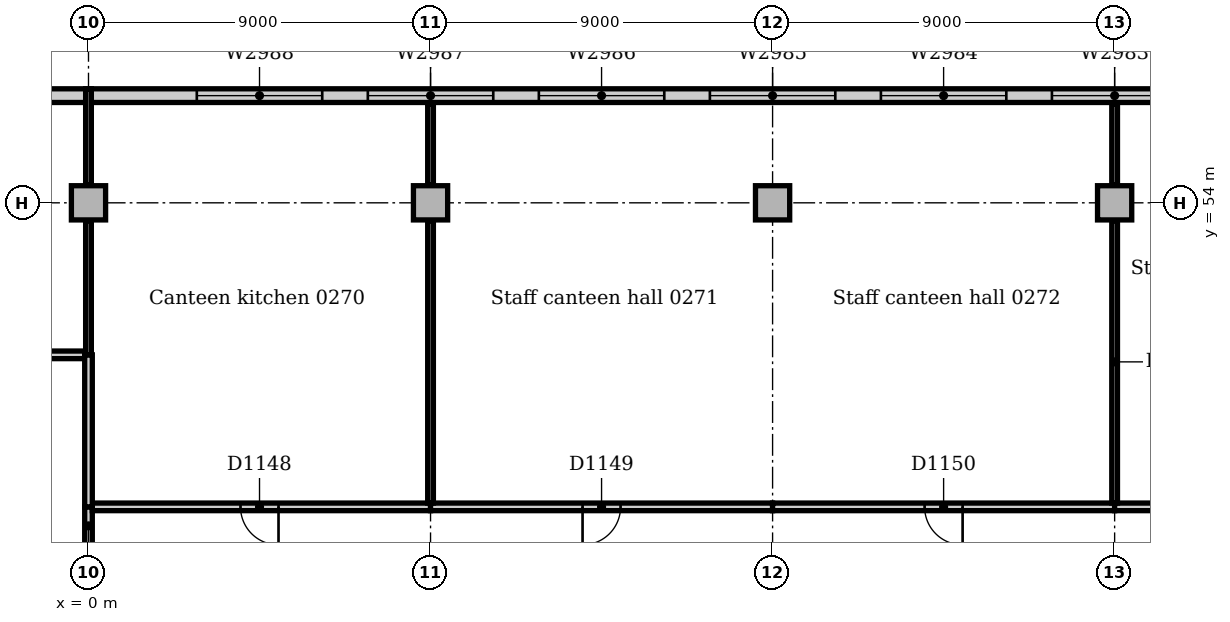
"""IFC4 building model, lengths in metres.
Left out: names, types, materials, properties, quantities, classifications, styles, units other than length and angle.
Written with IfcOpenShell. Run it as: python <this file> out.ifc"""

import sys

from ifc_helpers import new_model, si_unit, direction, frame, frame_2d, origin, origin_2d, place, context, subcontext, project, spatial, rectangle, extrude, element, fill, save


model = new_model("IFC4")
c1 = context("Model", 3, precision=1e-05, world=origin(), true_north=direction((0.0, 1.0)))
c2 = subcontext(c1, "Body", "Model", "MODEL_VIEW")
j1 = project(units=[si_unit("LENGTHUNIT", "METRE"), si_unit("PLANEANGLEUNIT", "RADIAN")], contexts=[c1])
p1 = place(None, origin())
s1 = spatial("IfcSite", under=j1, at=p1, CompositionType="ELEMENT")
p2 = place(p1, origin())
s2 = spatial("IfcBuilding", under=s1, at=p2, CompositionType="ELEMENT")
p3 = place(p2, frame((0.0, 0.0, 11.0)))
s3 = spatial("IfcBuildingStorey", under=s2, at=p3, CompositionType="ELEMENT", Elevation=11.0)
for number, where, z_axis, x_axis in (
    (1, (0.0, 54.0, 0.0), (0.0, 0.0, 1.0), (1.0, 0.0, 0.0)),
    (2, (9.0, 54.0, 0.0), (0.0, 0.0, 1.0), (1.0, 0.0, 0.0)),
    (3, (18.0, 54.0, 0.0), (0.0, 0.0, 1.0), (1.0, 0.0, 0.0)),
    (4, (27.0, 54.0, 0.0), (0.0, 0.0, 1.0), (1.0, 0.0, 0.0)),
):
    element("IfcColumn", number, at=place(p3, frame(where, z_axis=z_axis, x_axis=x_axis)), inside=s3, PredefinedType="COLUMN", context=c2, shape_type="SweptSolid", body=[
        extrude(rectangle(XDim=0.9, YDim=0.9, at=origin_2d()), origin(), (0.0, 0.0, 1.0), 4.7),
    ])
p4 = place(p3, frame((63.0, 56.82, 0.0), z_axis=(0.0, 0.0, 1.0), x_axis=(-1.0, 0.0, 0.0)))
e5 = element("IfcWall", 5, at=p4, inside=s3, PredefinedType="STANDARD", context=c2, shape_type="SweptSolid", body=[
    extrude(rectangle(XDim=144.0, YDim=0.36, at=frame_2d((72.0, 0.0))), origin(), (0.0, 0.0, 1.0), 4.7),
])
p5 = place(p4, frame((2.85, 0.0, 0.9)))
e6 = element("IfcOpeningElement", 6, at=p5, cuts=e5, PredefinedType="OPENING", context=c2, shape_type="SweptSolid", body=[
    extrude(rectangle(XDim=3.3, YDim=2.4, at=frame_2d((1.65, 1.2))), frame((0.0, 0.19, 0.0), z_axis=(0.0, -1.0, 0.0), x_axis=(1.0, 0.0, 0.0)), (0.0, 0.0, 1.0), 0.38),
])
p6 = place(p4, frame((7.35, 0.0, 0.9)))
e7 = element("IfcOpeningElement", 7, at=p6, cuts=e5, PredefinedType="OPENING", context=c2, shape_type="SweptSolid", body=[
    extrude(rectangle(XDim=3.3, YDim=2.4, at=frame_2d((1.65, 1.2))), frame((0.0, 0.19, 0.0), z_axis=(0.0, -1.0, 0.0), x_axis=(1.0, 0.0, 0.0)), (0.0, 0.0, 1.0), 0.38),
])
p7 = place(p4, frame((11.85, 0.0, 0.9)))
e8 = element("IfcOpeningElement", 8, at=p7, cuts=e5, PredefinedType="OPENING", context=c2, shape_type="SweptSolid", body=[
    extrude(rectangle(XDim=3.3, YDim=2.4, at=frame_2d((1.65, 1.2))), frame((0.0, 0.19, 0.0), z_axis=(0.0, -1.0, 0.0), x_axis=(1.0, 0.0, 0.0)), (0.0, 0.0, 1.0), 0.38),
])
p8 = place(p4, frame((16.35, 0.0, 0.9)))
e9 = element("IfcOpeningElement", 9, at=p8, cuts=e5, PredefinedType="OPENING", context=c2, shape_type="SweptSolid", body=[
    extrude(rectangle(XDim=3.3, YDim=2.4, at=frame_2d((1.65, 1.2))), frame((0.0, 0.19, 0.0), z_axis=(0.0, -1.0, 0.0), x_axis=(1.0, 0.0, 0.0)), (0.0, 0.0, 1.0), 0.38),
])
p9 = place(p4, frame((20.85, 0.0, 0.9)))
e10 = element("IfcOpeningElement", 10, at=p9, cuts=e5, PredefinedType="OPENING", context=c2, shape_type="SweptSolid", body=[
    extrude(rectangle(XDim=3.3, YDim=2.4, at=frame_2d((1.65, 1.2))), frame((0.0, 0.19, 0.0), z_axis=(0.0, -1.0, 0.0), x_axis=(1.0, 0.0, 0.0)), (0.0, 0.0, 1.0), 0.38),
])
p10 = place(p4, frame((25.35, 0.0, 0.9)))
e11 = element("IfcOpeningElement", 11, at=p10, cuts=e5, PredefinedType="OPENING", context=c2, shape_type="SweptSolid", body=[
    extrude(rectangle(XDim=3.3, YDim=2.4, at=frame_2d((1.65, 1.2))), frame((0.0, 0.19, 0.0), z_axis=(0.0, -1.0, 0.0), x_axis=(1.0, 0.0, 0.0)), (0.0, 0.0, 1.0), 0.38),
])
p11 = place(p4, frame((29.85, 0.0, 0.9)))
e12 = element("IfcOpeningElement", 12, at=p11, cuts=e5, PredefinedType="OPENING", context=c2, shape_type="SweptSolid", body=[
    extrude(rectangle(XDim=3.3, YDim=2.4, at=frame_2d((1.65, 1.2))), frame((0.0, 0.19, 0.0), z_axis=(0.0, -1.0, 0.0), x_axis=(1.0, 0.0, 0.0)), (0.0, 0.0, 1.0), 0.38),
])
p12 = place(p4, frame((34.35, 0.0, 0.9)))
e13 = element("IfcOpeningElement", 13, at=p12, cuts=e5, PredefinedType="OPENING", context=c2, shape_type="SweptSolid", body=[
    extrude(rectangle(XDim=3.3, YDim=2.4, at=frame_2d((1.65, 1.2))), frame((0.0, 0.19, 0.0), z_axis=(0.0, -1.0, 0.0), x_axis=(1.0, 0.0, 0.0)), (0.0, 0.0, 1.0), 0.38),
])
p13 = place(p4, frame((38.85, 0.0, 0.9)))
e14 = element("IfcOpeningElement", 14, at=p13, cuts=e5, PredefinedType="OPENING", context=c2, shape_type="SweptSolid", body=[
    extrude(rectangle(XDim=3.3, YDim=2.4, at=frame_2d((1.65, 1.2))), frame((0.0, 0.19, 0.0), z_axis=(0.0, -1.0, 0.0), x_axis=(1.0, 0.0, 0.0)), (0.0, 0.0, 1.0), 0.38),
])
p14 = place(p4, frame((43.35, 0.0, 0.9)))
e15 = element("IfcOpeningElement", 15, at=p14, cuts=e5, PredefinedType="OPENING", context=c2, shape_type="SweptSolid", body=[
    extrude(rectangle(XDim=3.3, YDim=2.4, at=frame_2d((1.65, 1.2))), frame((0.0, 0.19, 0.0), z_axis=(0.0, -1.0, 0.0), x_axis=(1.0, 0.0, 0.0)), (0.0, 0.0, 1.0), 0.38),
])
p15 = place(p4, frame((47.85, 0.0, 0.9)))
e16 = element("IfcOpeningElement", 16, at=p15, cuts=e5, PredefinedType="OPENING", context=c2, shape_type="SweptSolid", body=[
    extrude(rectangle(XDim=3.3, YDim=2.4, at=frame_2d((1.65, 1.2))), frame((0.0, 0.19, 0.0), z_axis=(0.0, -1.0, 0.0), x_axis=(1.0, 0.0, 0.0)), (0.0, 0.0, 1.0), 0.38),
])
p16 = place(p4, frame((52.35, 0.0, 0.9)))
e17 = element("IfcOpeningElement", 17, at=p16, cuts=e5, PredefinedType="OPENING", context=c2, shape_type="SweptSolid", body=[
    extrude(rectangle(XDim=3.3, YDim=2.4, at=frame_2d((1.65, 1.2))), frame((0.0, 0.19, 0.0), z_axis=(0.0, -1.0, 0.0), x_axis=(1.0, 0.0, 0.0)), (0.0, 0.0, 1.0), 0.38),
])
p17 = place(p4, frame((56.85, 0.0, 0.9)))
e18 = element("IfcOpeningElement", 18, at=p17, cuts=e5, PredefinedType="OPENING", context=c2, shape_type="SweptSolid", body=[
    extrude(rectangle(XDim=3.3, YDim=2.4, at=frame_2d((1.65, 1.2))), frame((0.0, 0.19, 0.0), z_axis=(0.0, -1.0, 0.0), x_axis=(1.0, 0.0, 0.0)), (0.0, 0.0, 1.0), 0.38),
])
p18 = place(p4, frame((92.85, 0.0, 0.9)))
e19 = element("IfcOpeningElement", 19, at=p18, cuts=e5, PredefinedType="OPENING", context=c2, shape_type="SweptSolid", body=[
    extrude(rectangle(XDim=3.3, YDim=2.4, at=frame_2d((1.65, 1.2))), frame((0.0, 0.19, 0.0), z_axis=(0.0, -1.0, 0.0), x_axis=(1.0, 0.0, 0.0)), (0.0, 0.0, 1.0), 0.38),
])
p19 = place(p4, frame((97.35, 0.0, 0.9)))
e20 = element("IfcOpeningElement", 20, at=p19, cuts=e5, PredefinedType="OPENING", context=c2, shape_type="SweptSolid", body=[
    extrude(rectangle(XDim=3.3, YDim=2.4, at=frame_2d((1.65, 1.2))), frame((0.0, 0.19, 0.0), z_axis=(0.0, -1.0, 0.0), x_axis=(1.0, 0.0, 0.0)), (0.0, 0.0, 1.0), 0.38),
])
p20 = place(p4, frame((101.85, 0.0, 0.9)))
e21 = element("IfcOpeningElement", 21, at=p20, cuts=e5, PredefinedType="OPENING", context=c2, shape_type="SweptSolid", body=[
    extrude(rectangle(XDim=3.3, YDim=2.4, at=frame_2d((1.65, 1.2))), frame((0.0, 0.19, 0.0), z_axis=(0.0, -1.0, 0.0), x_axis=(1.0, 0.0, 0.0)), (0.0, 0.0, 1.0), 0.38),
])
p21 = place(p4, frame((106.35, 0.0, 0.9)))
e22 = element("IfcOpeningElement", 22, at=p21, cuts=e5, PredefinedType="OPENING", context=c2, shape_type="SweptSolid", body=[
    extrude(rectangle(XDim=3.3, YDim=2.4, at=frame_2d((1.65, 1.2))), frame((0.0, 0.19, 0.0), z_axis=(0.0, -1.0, 0.0), x_axis=(1.0, 0.0, 0.0)), (0.0, 0.0, 1.0), 0.38),
])
p22 = place(p4, frame((110.85, 0.0, 0.9)))
e23 = element("IfcOpeningElement", 23, at=p22, cuts=e5, PredefinedType="OPENING", context=c2, shape_type="SweptSolid", body=[
    extrude(rectangle(XDim=3.3, YDim=2.4, at=frame_2d((1.65, 1.2))), frame((0.0, 0.19, 0.0), z_axis=(0.0, -1.0, 0.0), x_axis=(1.0, 0.0, 0.0)), (0.0, 0.0, 1.0), 0.38),
])
p23 = place(p4, frame((115.35, 0.0, 0.9)))
e24 = element("IfcOpeningElement", 24, at=p23, cuts=e5, PredefinedType="OPENING", context=c2, shape_type="SweptSolid", body=[
    extrude(rectangle(XDim=3.3, YDim=2.4, at=frame_2d((1.65, 1.2))), frame((0.0, 0.19, 0.0), z_axis=(0.0, -1.0, 0.0), x_axis=(1.0, 0.0, 0.0)), (0.0, 0.0, 1.0), 0.38),
])
p24 = place(p4, frame((119.85, 0.0, 0.9)))
e25 = element("IfcOpeningElement", 25, at=p24, cuts=e5, PredefinedType="OPENING", context=c2, shape_type="SweptSolid", body=[
    extrude(rectangle(XDim=3.3, YDim=2.4, at=frame_2d((1.65, 1.2))), frame((0.0, 0.19, 0.0), z_axis=(0.0, -1.0, 0.0), x_axis=(1.0, 0.0, 0.0)), (0.0, 0.0, 1.0), 0.38),
])
p25 = place(p4, frame((124.35, 0.0, 0.9)))
e26 = element("IfcOpeningElement", 26, at=p25, cuts=e5, PredefinedType="OPENING", context=c2, shape_type="SweptSolid", body=[
    extrude(rectangle(XDim=3.3, YDim=2.4, at=frame_2d((1.65, 1.2))), frame((0.0, 0.19, 0.0), z_axis=(0.0, -1.0, 0.0), x_axis=(1.0, 0.0, 0.0)), (0.0, 0.0, 1.0), 0.38),
])
p26 = place(p4, frame((128.85, 0.0, 0.9)))
e27 = element("IfcOpeningElement", 27, at=p26, cuts=e5, PredefinedType="OPENING", context=c2, shape_type="SweptSolid", body=[
    extrude(rectangle(XDim=3.3, YDim=2.4, at=frame_2d((1.65, 1.2))), frame((0.0, 0.19, 0.0), z_axis=(0.0, -1.0, 0.0), x_axis=(1.0, 0.0, 0.0)), (0.0, 0.0, 1.0), 0.38),
])
p27 = place(p4, frame((133.35, 0.0, 0.9)))
e28 = element("IfcOpeningElement", 28, at=p27, cuts=e5, PredefinedType="OPENING", context=c2, shape_type="SweptSolid", body=[
    extrude(rectangle(XDim=3.3, YDim=2.4, at=frame_2d((1.65, 1.2))), frame((0.0, 0.19, 0.0), z_axis=(0.0, -1.0, 0.0), x_axis=(1.0, 0.0, 0.0)), (0.0, 0.0, 1.0), 0.38),
])
p28 = place(p4, frame((137.85, 0.0, 0.9)))
e29 = element("IfcOpeningElement", 29, at=p28, cuts=e5, PredefinedType="OPENING", context=c2, shape_type="SweptSolid", body=[
    extrude(rectangle(XDim=3.3, YDim=2.4, at=frame_2d((1.65, 1.2))), frame((0.0, 0.19, 0.0), z_axis=(0.0, -1.0, 0.0), x_axis=(1.0, 0.0, 0.0)), (0.0, 0.0, 1.0), 0.38),
])
p29 = place(p3, frame((0.0, 45.0, 0.0), z_axis=(0.0, 0.0, 1.0), x_axis=(0.0, 1.0, 0.0)))
e30 = element("IfcWall", 30, at=p29, inside=s3, PredefinedType="PARTITIONING", context=c2, shape_type="SweptSolid", body=[
    extrude(rectangle(XDim=1.0, YDim=0.2, at=frame_2d((0.5, 0.0))), origin(), (0.0, 0.0, 1.0), 4.7),
])
p30 = place(p3, frame((0.1, 46.0, 0.0), z_axis=(0.0, 0.0, 1.0), x_axis=(1.0, 0.0, 0.0)))
e31 = element("IfcWall", 31, at=p30, inside=s3, PredefinedType="PARTITIONING", context=c2, shape_type="SweptSolid", body=[
    extrude(rectangle(XDim=8.9, YDim=0.2, at=frame_2d((4.45, 0.0))), origin(), (0.0, 0.0, 1.0), 4.7),
])
p31 = place(p30, frame((3.9, 0.0, 0.0)))
e32 = element("IfcOpeningElement", 32, at=p31, cuts=e31, PredefinedType="OPENING", context=c2, shape_type="SweptSolid", body=[
    extrude(rectangle(XDim=1.0, YDim=2.1, at=frame_2d((0.5, 1.05))), frame((0.0, 0.11, 0.0), z_axis=(0.0, -1.0, 0.0), x_axis=(1.0, 0.0, 0.0)), (0.0, 0.0, 1.0), 0.22),
])
p32 = place(p3, frame((9.0, 46.0, 0.0), z_axis=(0.0, 0.0, 1.0), x_axis=(1.0, 0.0, 0.0)))
e33 = element("IfcWall", 33, at=p32, inside=s3, PredefinedType="PARTITIONING", context=c2, shape_type="SweptSolid", body=[
    extrude(rectangle(XDim=9.0, YDim=0.2, at=frame_2d((4.5, 0.0))), origin(), (0.0, 0.0, 1.0), 4.7),
])
p33 = place(p32, frame((4.0, 0.0, 0.0)))
e34 = element("IfcOpeningElement", 34, at=p33, cuts=e33, PredefinedType="OPENING", context=c2, shape_type="SweptSolid", body=[
    extrude(rectangle(XDim=1.0, YDim=2.1, at=frame_2d((0.5, 1.05))), frame((0.0, 0.11, 0.0), z_axis=(0.0, -1.0, 0.0), x_axis=(1.0, 0.0, 0.0)), (0.0, 0.0, 1.0), 0.22),
])
p34 = place(p3, frame((18.0, 46.0, 0.0), z_axis=(0.0, 0.0, 1.0), x_axis=(1.0, 0.0, 0.0)))
e35 = element("IfcWall", 35, at=p34, inside=s3, PredefinedType="PARTITIONING", context=c2, shape_type="SweptSolid", body=[
    extrude(rectangle(XDim=9.0, YDim=0.2, at=frame_2d((4.5, 0.0))), origin(), (0.0, 0.0, 1.0), 4.7),
])
p35 = place(p34, frame((4.0, 0.0, 0.0)))
e36 = element("IfcOpeningElement", 36, at=p35, cuts=e35, PredefinedType="OPENING", context=c2, shape_type="SweptSolid", body=[
    extrude(rectangle(XDim=1.0, YDim=2.1, at=frame_2d((0.5, 1.05))), frame((0.0, 0.11, 0.0), z_axis=(0.0, -1.0, 0.0), x_axis=(1.0, 0.0, 0.0)), (0.0, 0.0, 1.0), 0.22),
])
p36 = place(p3, frame((27.0, 46.0, 0.0), z_axis=(0.0, 0.0, 1.0), x_axis=(1.0, 0.0, 0.0)))
e37 = element("IfcWall", 37, at=p36, inside=s3, PredefinedType="PARTITIONING", context=c2, shape_type="SweptSolid", body=[
    extrude(rectangle(XDim=8.9, YDim=0.2, at=frame_2d((4.45, 0.0))), origin(), (0.0, 0.0, 1.0), 4.7),
])
p37 = place(p36, frame((4.0, 0.0, 0.0)))
e38 = element("IfcOpeningElement", 38, at=p37, cuts=e37, PredefinedType="OPENING", context=c2, shape_type="SweptSolid", body=[
    extrude(rectangle(XDim=1.0, YDim=2.1, at=frame_2d((0.5, 1.05))), frame((0.0, 0.11, 0.0), z_axis=(0.0, -1.0, 0.0), x_axis=(1.0, 0.0, 0.0)), (0.0, 0.0, 1.0), 0.22),
])
p38 = place(p3, frame((-9.0, 50.0, 0.0), z_axis=(0.0, 0.0, 1.0), x_axis=(1.0, 0.0, 0.0)))
e39 = element("IfcWall", 39, at=p38, inside=s3, PredefinedType="PARTITIONING", context=c2, shape_type="SweptSolid", body=[
    extrude(rectangle(XDim=8.9, YDim=0.2, at=frame_2d((4.45, 0.0))), origin(), (0.0, 0.0, 1.0), 4.7),
])
p39 = place(p38, frame((4.0, 0.0, 0.0)))
e40 = element("IfcOpeningElement", 40, at=p39, cuts=e39, PredefinedType="OPENING", context=c2, shape_type="SweptSolid", body=[
    extrude(rectangle(XDim=1.0, YDim=2.1, at=frame_2d((0.5, 1.05))), frame((0.0, 0.11, 0.0), z_axis=(0.0, -1.0, 0.0), x_axis=(1.0, 0.0, 0.0)), (0.0, 0.0, 1.0), 0.22),
])
p40 = place(p3, frame((0.0, 46.0, 0.0), z_axis=(0.0, 0.0, 1.0), x_axis=(0.0, 1.0, 0.0)))
e41 = element("IfcWall", 41, at=p40, inside=s3, PredefinedType="PARTITIONING", context=c2, shape_type="SweptSolid", body=[
    extrude(rectangle(XDim=4.0, YDim=0.2, at=frame_2d((2.0, 0.0))), origin(), (0.0, 0.0, 1.0), 4.7),
])
p41 = place(p3, frame((0.0, 50.0, 0.0), z_axis=(0.0, 0.0, 1.0), x_axis=(0.0, 1.0, 0.0)))
e42 = element("IfcWall", 42, at=p41, inside=s3, PredefinedType="PARTITIONING", context=c2, shape_type="SweptSolid", body=[
    extrude(rectangle(XDim=3.53, YDim=0.15, at=frame_2d((1.765, 0.0))), origin(), (0.0, 0.0, 1.0), 4.7),
])
p42 = place(p3, frame((0.0, 54.47, 0.0), z_axis=(0.0, 0.0, 1.0), x_axis=(0.0, 1.0, 0.0)))
e43 = element("IfcWall", 43, at=p42, inside=s3, PredefinedType="PARTITIONING", context=c2, shape_type="SweptSolid", body=[
    extrude(rectangle(XDim=2.53, YDim=0.15, at=frame_2d((1.265, 0.0))), origin(), (0.0, 0.0, 1.0), 4.7),
])
p43 = place(p3, frame((9.0, 46.1, 0.0), z_axis=(0.0, 0.0, 1.0), x_axis=(0.0, 1.0, 0.0)))
e44 = element("IfcWall", 44, at=p43, inside=s3, PredefinedType="PARTITIONING", context=c2, shape_type="SweptSolid", body=[
    extrude(rectangle(XDim=7.43, YDim=0.15, at=frame_2d((3.715, 0.0))), origin(), (0.0, 0.0, 1.0), 4.7),
])
p44 = place(p3, frame((9.0, 54.47, 0.0), z_axis=(0.0, 0.0, 1.0), x_axis=(0.0, 1.0, 0.0)))
e45 = element("IfcWall", 45, at=p44, inside=s3, PredefinedType="PARTITIONING", context=c2, shape_type="SweptSolid", body=[
    extrude(rectangle(XDim=2.13, YDim=0.15, at=frame_2d((1.065, 0.0))), origin(), (0.0, 0.0, 1.0), 4.7),
])
p45 = place(p3, frame((27.0, 46.1, 0.0), z_axis=(0.0, 0.0, 1.0), x_axis=(0.0, 1.0, 0.0)))
e46 = element("IfcWall", 46, at=p45, inside=s3, PredefinedType="PARTITIONING", context=c2, shape_type="SweptSolid", body=[
    extrude(rectangle(XDim=7.43, YDim=0.15, at=frame_2d((3.715, 0.0))), origin(), (0.0, 0.0, 1.0), 4.7),
])
p46 = place(p3, frame((27.0, 54.47, 0.0), z_axis=(0.0, 0.0, 1.0), x_axis=(0.0, 1.0, 0.0)))
e47 = element("IfcWall", 47, at=p46, inside=s3, PredefinedType="PARTITIONING", context=c2, shape_type="SweptSolid", body=[
    extrude(rectangle(XDim=2.13, YDim=0.15, at=frame_2d((1.065, 0.0))), origin(), (0.0, 0.0, 1.0), 4.7),
])
p47 = place(p12, origin())
e48 = element("IfcWindow", 48, at=p47, inside=s3, PartitioningType="SINGLE_PANEL", PredefinedType="WINDOW", context=c2, shape_type="SweptSolid", body=[
    extrude(rectangle(XDim=3.3, YDim=2.4, at=frame_2d((1.65, 1.2))), frame((0.0, 0.13, 0.0), z_axis=(0.0, -1.0, 0.0), x_axis=(1.0, 0.0, 0.0)), (0.0, 0.0, 1.0), 0.06),
])
fill(e13, e48)
p48 = place(p13, origin())
e49 = element("IfcWindow", 49, at=p48, inside=s3, PartitioningType="SINGLE_PANEL", PredefinedType="WINDOW", context=c2, shape_type="SweptSolid", body=[
    extrude(rectangle(XDim=3.3, YDim=2.4, at=frame_2d((1.65, 1.2))), frame((0.0, 0.13, 0.0), z_axis=(0.0, -1.0, 0.0), x_axis=(1.0, 0.0, 0.0)), (0.0, 0.0, 1.0), 0.06),
])
fill(e14, e49)
p49 = place(p14, origin())
e50 = element("IfcWindow", 50, at=p49, inside=s3, PartitioningType="SINGLE_PANEL", PredefinedType="WINDOW", context=c2, shape_type="SweptSolid", body=[
    extrude(rectangle(XDim=3.3, YDim=2.4, at=frame_2d((1.65, 1.2))), frame((0.0, 0.13, 0.0), z_axis=(0.0, -1.0, 0.0), x_axis=(1.0, 0.0, 0.0)), (0.0, 0.0, 1.0), 0.06),
])
fill(e15, e50)
p50 = place(p15, origin())
e51 = element("IfcWindow", 51, at=p50, inside=s3, PartitioningType="SINGLE_PANEL", PredefinedType="WINDOW", context=c2, shape_type="SweptSolid", body=[
    extrude(rectangle(XDim=3.3, YDim=2.4, at=frame_2d((1.65, 1.2))), frame((0.0, 0.13, 0.0), z_axis=(0.0, -1.0, 0.0), x_axis=(1.0, 0.0, 0.0)), (0.0, 0.0, 1.0), 0.06),
])
fill(e16, e51)
p51 = place(p16, origin())
e52 = element("IfcWindow", 52, at=p51, inside=s3, PartitioningType="SINGLE_PANEL", PredefinedType="WINDOW", context=c2, shape_type="SweptSolid", body=[
    extrude(rectangle(XDim=3.3, YDim=2.4, at=frame_2d((1.65, 1.2))), frame((0.0, 0.13, 0.0), z_axis=(0.0, -1.0, 0.0), x_axis=(1.0, 0.0, 0.0)), (0.0, 0.0, 1.0), 0.06),
])
fill(e17, e52)
p52 = place(p17, origin())
e53 = element("IfcWindow", 53, at=p52, inside=s3, PartitioningType="SINGLE_PANEL", PredefinedType="WINDOW", context=c2, shape_type="SweptSolid", body=[
    extrude(rectangle(XDim=3.3, YDim=2.4, at=frame_2d((1.65, 1.2))), frame((0.0, 0.13, 0.0), z_axis=(0.0, -1.0, 0.0), x_axis=(1.0, 0.0, 0.0)), (0.0, 0.0, 1.0), 0.06),
])
fill(e18, e53)
p53 = place(p31, frame((1.0, 0.0, 0.0), z_axis=(0.0, 0.0, 1.0), x_axis=(-1.0, 0.0, 0.0)))
e54 = element("IfcDoor", 54, at=p53, inside=s3, OperationType="SINGLE_SWING_LEFT", PredefinedType="DOOR", context=c2, shape_type="SweptSolid", body=[
    extrude(rectangle(XDim=1.0, YDim=2.1, at=frame_2d((0.5, 1.05))), frame((0.0, 0.025, 0.0), z_axis=(0.0, -1.0, 0.0), x_axis=(1.0, 0.0, 0.0)), (0.0, 0.0, 1.0), 0.05),
])
fill(e32, e54)
p54 = place(p33, frame((1.0, 0.0, 0.0), z_axis=(0.0, 0.0, 1.0), x_axis=(-1.0, 0.0, 0.0)))
e55 = element("IfcDoor", 55, at=p54, inside=s3, OperationType="SINGLE_SWING_RIGHT", PredefinedType="DOOR", context=c2, shape_type="SweptSolid", body=[
    extrude(rectangle(XDim=1.0, YDim=2.1, at=frame_2d((0.5, 1.05))), frame((0.0, 0.025, 0.0), z_axis=(0.0, -1.0, 0.0), x_axis=(1.0, 0.0, 0.0)), (0.0, 0.0, 1.0), 0.05),
])
fill(e34, e55)
p55 = place(p35, frame((1.0, 0.0, 0.0), z_axis=(0.0, 0.0, 1.0), x_axis=(-1.0, 0.0, 0.0)))
e56 = element("IfcDoor", 56, at=p55, inside=s3, OperationType="SINGLE_SWING_LEFT", PredefinedType="DOOR", context=c2, shape_type="SweptSolid", body=[
    extrude(rectangle(XDim=1.0, YDim=2.1, at=frame_2d((0.5, 1.05))), frame((0.0, 0.025, 0.0), z_axis=(0.0, -1.0, 0.0), x_axis=(1.0, 0.0, 0.0)), (0.0, 0.0, 1.0), 0.05),
])
fill(e36, e56)
save(model, sys.argv[1])
